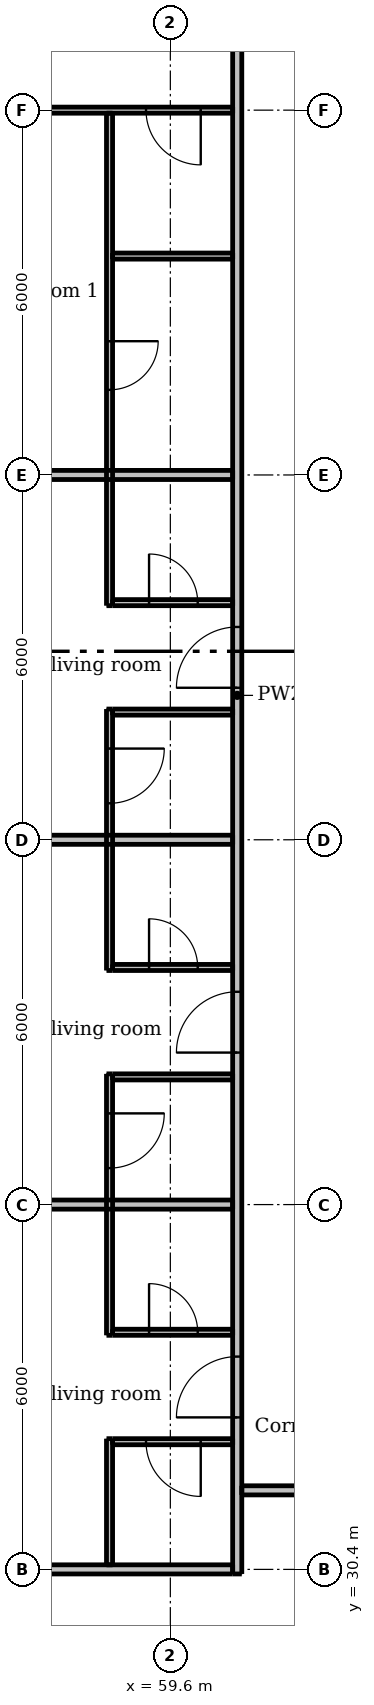
"""IFC4 building model, lengths in metres.
Left out: names, types, materials, properties, quantities, classifications, styles, units other than length and angle.
Written with IfcOpenShell. Run it as: python <this file> out.ifc"""

import sys

from ifc_helpers import new_model, si_unit, direction, frame, frame_2d, origin, place, context, subcontext, project, spatial, rectangle, extrude, element, fill, save


model = new_model("IFC4")
c1 = context("Model", 3, precision=1e-05, world=origin(), true_north=direction((0.0, 1.0)))
c2 = subcontext(c1, "Body", "Model", "MODEL_VIEW")
j1 = project(units=[si_unit("LENGTHUNIT", "METRE"), si_unit("PLANEANGLEUNIT", "RADIAN")], contexts=[c1])
p1 = place(None, origin())
s1 = spatial("IfcSite", under=j1, at=p1, CompositionType="ELEMENT")
p2 = place(p1, origin())
s2 = spatial("IfcBuilding", under=s1, at=p2, CompositionType="ELEMENT")
p3 = place(p2, frame((0.0, 0.0, 23.5)))
s3 = spatial("IfcBuildingStorey", under=s2, at=p3, CompositionType="ELEMENT", Elevation=23.5)
p4 = place(p3, frame((58.6, 30.475, 0.0), z_axis=(0.0, 0.0, 1.0), x_axis=(0.0, 1.0, 0.0)))
e1 = element("IfcWall", 1, at=p4, inside=s3, PredefinedType="PARTITIONING", context=c2, shape_type="SweptSolid", body=[
    extrude(rectangle(XDim=2.075, YDim=0.1, at=frame_2d((1.038, 0.0))), origin(), (0.0, 0.0, 1.0), 3.05),
])
p5 = place(p3, frame((58.6, 38.55, 0.0), z_axis=(0.0, 0.0, 1.0), x_axis=(0.0, -1.0, 0.0)))
e2 = element("IfcWall", 2, at=p5, inside=s3, PredefinedType="PARTITIONING", context=c2, shape_type="SweptSolid", body=[
    extrude(rectangle(XDim=4.3, YDim=0.1, at=frame_2d((2.15, 0.0))), origin(), (0.0, 0.0, 1.0), 3.05),
])
p6 = place(p5, frame((0.65, 0.0, 0.0)))
e3 = element("IfcOpeningElement", 3, at=p6, cuts=e2, PredefinedType="OPENING", context=c2, shape_type="SweptSolid", body=[
    extrude(rectangle(XDim=0.9, YDim=2.1, at=frame_2d((0.45, 1.05))), frame((0.0, 0.06, 0.0), z_axis=(0.0, -1.0, 0.0), x_axis=(1.0, 0.0, 0.0)), (0.0, 0.0, 1.0), 0.12),
])
p7 = place(p3, frame((58.6, 44.55, 0.0), z_axis=(0.0, 0.0, 1.0), x_axis=(0.0, -1.0, 0.0)))
e4 = element("IfcWall", 4, at=p7, inside=s3, PredefinedType="PARTITIONING", context=c2, shape_type="SweptSolid", body=[
    extrude(rectangle(XDim=4.3, YDim=0.1, at=frame_2d((2.15, 0.0))), origin(), (0.0, 0.0, 1.0), 3.05),
])
p8 = place(p7, frame((0.65, 0.0, 0.0)))
e5 = element("IfcOpeningElement", 5, at=p8, cuts=e4, PredefinedType="OPENING", context=c2, shape_type="SweptSolid", body=[
    extrude(rectangle(XDim=0.9, YDim=2.1, at=frame_2d((0.45, 1.05))), frame((0.0, 0.06, 0.0), z_axis=(0.0, -1.0, 0.0), x_axis=(1.0, 0.0, 0.0)), (0.0, 0.0, 1.0), 0.12),
])
p9 = place(p3, frame((58.6, 54.35, 0.0), z_axis=(0.0, 0.0, 1.0), x_axis=(0.0, -1.0, 0.0)))
e6 = element("IfcWall", 6, at=p9, inside=s3, PredefinedType="PARTITIONING", context=c2, shape_type="SweptSolid", body=[
    extrude(rectangle(XDim=8.1, YDim=0.1, at=frame_2d((4.05, 0.0))), origin(), (0.0, 0.0, 1.0), 3.05),
])
p10 = place(p9, frame((3.75, 0.0, 0.0)))
e7 = element("IfcOpeningElement", 7, at=p10, cuts=e6, PredefinedType="OPENING", context=c2, shape_type="SweptSolid", body=[
    extrude(rectangle(XDim=0.8, YDim=2.1, at=frame_2d((0.4, 1.05))), frame((0.0, 0.06, 0.0), z_axis=(0.0, -1.0, 0.0), x_axis=(1.0, 0.0, 0.0)), (0.0, 0.0, 1.0), 0.12),
])
p11 = place(p3, frame((60.625, 54.4, 0.0), z_axis=(0.0, 0.0, 1.0), x_axis=(-1.0, 0.0, 0.0)))
e8 = element("IfcWall", 8, at=p11, inside=s3, PredefinedType="PARTITIONING", context=c2, shape_type="SweptSolid", body=[
    extrude(rectangle(XDim=8.625, YDim=0.1, at=frame_2d((4.312, 0.0))), origin(), (0.0, 0.0, 1.0), 2.516),
])
p12 = place(p11, frame((0.525, 0.0, 0.0)))
e9 = element("IfcOpeningElement", 9, at=p12, cuts=e8, PredefinedType="OPENING", context=c2, shape_type="SweptSolid", body=[
    extrude(rectangle(XDim=0.9, YDim=2.1, at=frame_2d((0.45, 1.05))), frame((0.0, 0.06, 0.0), z_axis=(0.0, -1.0, 0.0), x_axis=(1.0, 0.0, 0.0)), (0.0, 0.0, 1.0), 0.12),
])
p13 = place(p11, frame((4.875, 0.0, 0.0)))
e10 = element("IfcOpeningElement", 10, at=p13, cuts=e8, PredefinedType="OPENING", context=c2, shape_type="SweptSolid", body=[
    extrude(rectangle(XDim=0.9, YDim=2.1, at=frame_2d((0.45, 1.05))), frame((0.0, 0.06, 0.0), z_axis=(0.0, -1.0, 0.0), x_axis=(1.0, 0.0, 0.0)), (0.0, 0.0, 1.0), 0.12),
])
p14 = place(p3, frame((58.65, 52.0, 0.0), z_axis=(0.0, 0.0, 1.0), x_axis=(1.0, 0.0, 0.0)))
e11 = element("IfcWall", 11, at=p14, inside=s3, PredefinedType="PARTITIONING", context=c2, shape_type="SweptSolid", body=[
    extrude(rectangle(XDim=1.975, YDim=0.1, at=frame_2d((0.988, 0.0))), origin(), (0.0, 0.0, 1.0), 3.05),
])
p15 = place(p3, frame((58.65, 46.3, 0.0), z_axis=(0.0, 0.0, 1.0), x_axis=(1.0, 0.0, 0.0)))
e12 = element("IfcWall", 12, at=p15, inside=s3, PredefinedType="PARTITIONING", context=c2, shape_type="SweptSolid", body=[
    extrude(rectangle(XDim=1.975, YDim=0.1, at=frame_2d((0.988, 0.0))), origin(), (0.0, 0.0, 1.0), 3.05),
])
p16 = place(p15, frame((0.6, 0.0, 0.0)))
e13 = element("IfcOpeningElement", 13, at=p16, cuts=e12, PredefinedType="OPENING", context=c2, shape_type="SweptSolid", body=[
    extrude(rectangle(XDim=0.8, YDim=2.1, at=frame_2d((0.4, 1.05))), frame((0.0, 0.06, 0.0), z_axis=(0.0, -1.0, 0.0), x_axis=(1.0, 0.0, 0.0)), (0.0, 0.0, 1.0), 0.12),
])
p17 = place(p3, frame((58.65, 44.5, 0.0), z_axis=(0.0, 0.0, 1.0), x_axis=(1.0, 0.0, 0.0)))
e14 = element("IfcWall", 14, at=p17, inside=s3, PredefinedType="PARTITIONING", context=c2, shape_type="SweptSolid", body=[
    extrude(rectangle(XDim=1.975, YDim=0.1, at=frame_2d((0.988, 0.0))), origin(), (0.0, 0.0, 1.0), 3.05),
])
p18 = place(p3, frame((58.65, 40.3, 0.0), z_axis=(0.0, 0.0, 1.0), x_axis=(1.0, 0.0, 0.0)))
e15 = element("IfcWall", 15, at=p18, inside=s3, PredefinedType="PARTITIONING", context=c2, shape_type="SweptSolid", body=[
    extrude(rectangle(XDim=1.975, YDim=0.1, at=frame_2d((0.988, 0.0))), origin(), (0.0, 0.0, 1.0), 3.05),
])
p19 = place(p18, frame((0.6, 0.0, 0.0)))
e16 = element("IfcOpeningElement", 16, at=p19, cuts=e15, PredefinedType="OPENING", context=c2, shape_type="SweptSolid", body=[
    extrude(rectangle(XDim=0.8, YDim=2.1, at=frame_2d((0.4, 1.05))), frame((0.0, 0.06, 0.0), z_axis=(0.0, -1.0, 0.0), x_axis=(1.0, 0.0, 0.0)), (0.0, 0.0, 1.0), 0.12),
])
p20 = place(p3, frame((58.65, 38.5, 0.0), z_axis=(0.0, 0.0, 1.0), x_axis=(1.0, 0.0, 0.0)))
e17 = element("IfcWall", 17, at=p20, inside=s3, PredefinedType="PARTITIONING", context=c2, shape_type="SweptSolid", body=[
    extrude(rectangle(XDim=1.975, YDim=0.1, at=frame_2d((0.988, 0.0))), origin(), (0.0, 0.0, 1.0), 3.05),
])
p21 = place(p3, frame((58.65, 34.3, 0.0), z_axis=(0.0, 0.0, 1.0), x_axis=(1.0, 0.0, 0.0)))
e18 = element("IfcWall", 18, at=p21, inside=s3, PredefinedType="PARTITIONING", context=c2, shape_type="SweptSolid", body=[
    extrude(rectangle(XDim=1.975, YDim=0.1, at=frame_2d((0.988, 0.0))), origin(), (0.0, 0.0, 1.0), 3.05),
])
p22 = place(p21, frame((0.6, 0.0, 0.0)))
e19 = element("IfcOpeningElement", 19, at=p22, cuts=e18, PredefinedType="OPENING", context=c2, shape_type="SweptSolid", body=[
    extrude(rectangle(XDim=0.8, YDim=2.1, at=frame_2d((0.4, 1.05))), frame((0.0, 0.06, 0.0), z_axis=(0.0, -1.0, 0.0), x_axis=(1.0, 0.0, 0.0)), (0.0, 0.0, 1.0), 0.12),
])
p23 = place(p3, frame((60.625, 32.5, 0.0), z_axis=(0.0, 0.0, 1.0), x_axis=(-1.0, 0.0, 0.0)))
e20 = element("IfcWall", 20, at=p23, inside=s3, PredefinedType="PARTITIONING", context=c2, shape_type="SweptSolid", body=[
    extrude(rectangle(XDim=1.975, YDim=0.1, at=frame_2d((0.988, 0.0))), origin(), (0.0, 0.0, 1.0), 3.05),
])
p24 = place(p23, frame((0.525, 0.0, 0.0)))
e21 = element("IfcOpeningElement", 21, at=p24, cuts=e20, PredefinedType="OPENING", context=c2, shape_type="SweptSolid", body=[
    extrude(rectangle(XDim=0.9, YDim=2.1, at=frame_2d((0.45, 1.05))), frame((0.0, 0.06, 0.0), z_axis=(0.0, -1.0, 0.0), x_axis=(1.0, 0.0, 0.0)), (0.0, 0.0, 1.0), 0.12),
])
p25 = place(p3, frame((60.7, 30.325, 0.0), z_axis=(0.0, 0.0, 1.0), x_axis=(0.0, 1.0, 0.0)))
e22 = element("IfcWall", 22, at=p25, inside=s3, PredefinedType="PARTITIONING", context=c2, shape_type="SweptSolid", body=[
    extrude(rectangle(XDim=28.9, YDim=0.15, at=frame_2d((14.45, 0.0))), origin(), (0.0, 0.0, 1.0), 3.05),
])
p26 = place(p25, frame((2.575, 0.0, 0.0)))
e23 = element("IfcOpeningElement", 23, at=p26, cuts=e22, PredefinedType="OPENING", context=c2, shape_type="SweptSolid", body=[
    extrude(rectangle(XDim=1.0, YDim=2.1, at=frame_2d((0.5, 1.05))), frame((0.0, 0.085, 0.0), z_axis=(0.0, -1.0, 0.0), x_axis=(1.0, 0.0, 0.0)), (0.0, 0.0, 1.0), 0.17),
])
p27 = place(p25, frame((8.575, 0.0, 0.0)))
e24 = element("IfcOpeningElement", 24, at=p27, cuts=e22, PredefinedType="OPENING", context=c2, shape_type="SweptSolid", body=[
    extrude(rectangle(XDim=1.0, YDim=2.1, at=frame_2d((0.5, 1.05))), frame((0.0, 0.085, 0.0), z_axis=(0.0, -1.0, 0.0), x_axis=(1.0, 0.0, 0.0)), (0.0, 0.0, 1.0), 0.17),
])
p28 = place(p25, frame((14.575, 0.0, 0.0)))
e25 = element("IfcOpeningElement", 25, at=p28, cuts=e22, PredefinedType="OPENING", context=c2, shape_type="SweptSolid", body=[
    extrude(rectangle(XDim=1.0, YDim=2.1, at=frame_2d((0.5, 1.05))), frame((0.0, 0.085, 0.0), z_axis=(0.0, -1.0, 0.0), x_axis=(1.0, 0.0, 0.0)), (0.0, 0.0, 1.0), 0.17),
])
p29 = place(p25, frame((26.025, 0.0, 0.0)))
e26 = element("IfcOpeningElement", 26, at=p29, cuts=e22, PredefinedType="OPENING", context=c2, shape_type="SweptSolid", body=[
    extrude(rectangle(XDim=1.0, YDim=2.1, at=frame_2d((0.5, 1.05))), frame((0.0, 0.085, 0.0), z_axis=(0.0, -1.0, 0.0), x_axis=(1.0, 0.0, 0.0)), (0.0, 0.0, 1.0), 0.17),
])
for number, where, z_axis, x_axis in (
    (27, (52.0, 48.4, 0.0), (0.0, 0.0, 1.0), (1.0, 0.0, 0.0)),
    (28, (52.0, 42.4, 0.0), (0.0, 0.0, 1.0), (1.0, 0.0, 0.0)),
    (29, (52.0, 36.4, 0.0), (0.0, 0.0, 1.0), (1.0, 0.0, 0.0)),
):
    element("IfcWall", number, at=place(p3, frame(where, z_axis=z_axis, x_axis=x_axis)), inside=s3, PredefinedType="PARTITIONING", context=c2, shape_type="SweptSolid", body=[
        extrude(rectangle(XDim=8.625, YDim=0.15, at=frame_2d((4.312, 0.0))), origin(), (0.0, 0.0, 1.0), 2.516),
    ])
p30 = place(p3, frame((89.525, 31.7, 0.0), z_axis=(0.0, 0.0, 1.0), x_axis=(-1.0, 0.0, 0.0)))
e30 = element("IfcWall", 30, at=p30, inside=s3, PredefinedType="PARTITIONING", context=c2, shape_type="SweptSolid", body=[
    extrude(rectangle(XDim=28.75, YDim=0.15, at=frame_2d((14.375, 0.0))), origin(), (0.0, 0.0, 1.0), 3.05),
])
p31 = place(p30, frame((24.625, 0.0, 0.0)))
e31 = element("IfcOpeningElement", 31, at=p31, cuts=e30, PredefinedType="OPENING", context=c2, shape_type="SweptSolid", body=[
    extrude(rectangle(XDim=1.0, YDim=2.1, at=frame_2d((0.5, 1.05))), frame((0.0, 0.085, 0.0), z_axis=(0.0, -1.0, 0.0), x_axis=(1.0, 0.0, 0.0)), (0.0, 0.0, 1.0), 0.17),
])
p32 = place(p30, frame((10.225, 0.0, 0.0)))
e32 = element("IfcOpeningElement", 32, at=p32, cuts=e30, PredefinedType="OPENING", context=c2, shape_type="SweptSolid", body=[
    extrude(rectangle(XDim=1.0, YDim=2.1, at=frame_2d((0.5, 1.05))), frame((0.0, 0.085, 0.0), z_axis=(0.0, -1.0, 0.0), x_axis=(1.0, 0.0, 0.0)), (0.0, 0.0, 1.0), 0.17),
])
p33 = place(p30, frame((2.425, 0.0, 0.0)))
e33 = element("IfcOpeningElement", 33, at=p33, cuts=e30, PredefinedType="OPENING", context=c2, shape_type="SweptSolid", body=[
    extrude(rectangle(XDim=1.0, YDim=2.1, at=frame_2d((0.5, 1.05))), frame((0.0, 0.085, 0.0), z_axis=(0.0, -1.0, 0.0), x_axis=(1.0, 0.0, 0.0)), (0.0, 0.0, 1.0), 0.17),
])
p34 = place(p3, frame((52.0, 30.4, 0.0), z_axis=(0.0, 0.0, 1.0), x_axis=(1.0, 0.0, 0.0)))
e34 = element("IfcWall", 34, at=p34, inside=s3, PredefinedType="PARTITIONING", context=c2, shape_type="SweptSolid", body=[
    extrude(rectangle(XDim=8.625, YDim=0.15, at=frame_2d((4.312, 0.0))), origin(), (0.0, 0.0, 1.0), 2.647),
])
p35 = place(p26, origin())
e35 = element("IfcDoor", 35, at=p35, inside=s3, OperationType="SINGLE_SWING_LEFT", PredefinedType="DOOR", context=c2, shape_type="SweptSolid", body=[
    extrude(rectangle(XDim=1.0, YDim=2.1, at=frame_2d((0.5, 1.05))), frame((0.0, 0.025, 0.0), z_axis=(0.0, -1.0, 0.0), x_axis=(1.0, 0.0, 0.0)), (0.0, 0.0, 1.0), 0.05),
])
fill(e23, e35)
p36 = place(p24, origin())
e36 = element("IfcDoor", 36, at=p36, inside=s3, OperationType="SINGLE_SWING_LEFT", PredefinedType="DOOR", context=c2, shape_type="SweptSolid", body=[
    extrude(rectangle(XDim=0.9, YDim=2.1, at=frame_2d((0.45, 1.05))), frame((0.0, 0.025, 0.0), z_axis=(0.0, -1.0, 0.0), x_axis=(1.0, 0.0, 0.0)), (0.0, 0.0, 1.0), 0.05),
])
fill(e21, e36)
p37 = place(p22, origin())
e37 = element("IfcDoor", 37, at=p37, inside=s3, OperationType="SINGLE_SWING_LEFT", PredefinedType="DOOR", context=c2, shape_type="SweptSolid", body=[
    extrude(rectangle(XDim=0.8, YDim=2.1, at=frame_2d((0.4, 1.05))), frame((0.0, 0.025, 0.0), z_axis=(0.0, -1.0, 0.0), x_axis=(1.0, 0.0, 0.0)), (0.0, 0.0, 1.0), 0.05),
])
fill(e19, e37)
p38 = place(p27, origin())
e38 = element("IfcDoor", 38, at=p38, inside=s3, OperationType="SINGLE_SWING_LEFT", PredefinedType="DOOR", context=c2, shape_type="SweptSolid", body=[
    extrude(rectangle(XDim=1.0, YDim=2.1, at=frame_2d((0.5, 1.05))), frame((0.0, 0.025, 0.0), z_axis=(0.0, -1.0, 0.0), x_axis=(1.0, 0.0, 0.0)), (0.0, 0.0, 1.0), 0.05),
])
fill(e24, e38)
p39 = place(p6, origin())
e39 = element("IfcDoor", 39, at=p39, inside=s3, OperationType="SINGLE_SWING_LEFT", PredefinedType="DOOR", context=c2, shape_type="SweptSolid", body=[
    extrude(rectangle(XDim=0.9, YDim=2.1, at=frame_2d((0.45, 1.05))), frame((0.0, 0.025, 0.0), z_axis=(0.0, -1.0, 0.0), x_axis=(1.0, 0.0, 0.0)), (0.0, 0.0, 1.0), 0.05),
])
fill(e3, e39)
p40 = place(p19, origin())
e40 = element("IfcDoor", 40, at=p40, inside=s3, OperationType="SINGLE_SWING_LEFT", PredefinedType="DOOR", context=c2, shape_type="SweptSolid", body=[
    extrude(rectangle(XDim=0.8, YDim=2.1, at=frame_2d((0.4, 1.05))), frame((0.0, 0.025, 0.0), z_axis=(0.0, -1.0, 0.0), x_axis=(1.0, 0.0, 0.0)), (0.0, 0.0, 1.0), 0.05),
])
fill(e16, e40)
p41 = place(p28, origin())
e41 = element("IfcDoor", 41, at=p41, inside=s3, OperationType="SINGLE_SWING_LEFT", PredefinedType="DOOR", context=c2, shape_type="SweptSolid", body=[
    extrude(rectangle(XDim=1.0, YDim=2.1, at=frame_2d((0.5, 1.05))), frame((0.0, 0.025, 0.0), z_axis=(0.0, -1.0, 0.0), x_axis=(1.0, 0.0, 0.0)), (0.0, 0.0, 1.0), 0.05),
])
fill(e25, e41)
p42 = place(p8, origin())
e42 = element("IfcDoor", 42, at=p42, inside=s3, OperationType="SINGLE_SWING_LEFT", PredefinedType="DOOR", context=c2, shape_type="SweptSolid", body=[
    extrude(rectangle(XDim=0.9, YDim=2.1, at=frame_2d((0.45, 1.05))), frame((0.0, 0.025, 0.0), z_axis=(0.0, -1.0, 0.0), x_axis=(1.0, 0.0, 0.0)), (0.0, 0.0, 1.0), 0.05),
])
fill(e5, e42)
p43 = place(p16, origin())
e43 = element("IfcDoor", 43, at=p43, inside=s3, OperationType="SINGLE_SWING_LEFT", PredefinedType="DOOR", context=c2, shape_type="SweptSolid", body=[
    extrude(rectangle(XDim=0.8, YDim=2.1, at=frame_2d((0.4, 1.05))), frame((0.0, 0.025, 0.0), z_axis=(0.0, -1.0, 0.0), x_axis=(1.0, 0.0, 0.0)), (0.0, 0.0, 1.0), 0.05),
])
fill(e13, e43)
p44 = place(p12, origin())
e44 = element("IfcDoor", 44, at=p44, inside=s3, OperationType="SINGLE_SWING_LEFT", PredefinedType="DOOR", context=c2, shape_type="SweptSolid", body=[
    extrude(rectangle(XDim=0.9, YDim=2.1, at=frame_2d((0.45, 1.05))), frame((0.0, 0.025, 0.0), z_axis=(0.0, -1.0, 0.0), x_axis=(1.0, 0.0, 0.0)), (0.0, 0.0, 1.0), 0.05),
])
fill(e9, e44)
p45 = place(p10, origin())
e45 = element("IfcDoor", 45, at=p45, inside=s3, OperationType="SINGLE_SWING_LEFT", PredefinedType="DOOR", context=c2, shape_type="SweptSolid", body=[
    extrude(rectangle(XDim=0.8, YDim=2.1, at=frame_2d((0.4, 1.05))), frame((0.0, 0.025, 0.0), z_axis=(0.0, -1.0, 0.0), x_axis=(1.0, 0.0, 0.0)), (0.0, 0.0, 1.0), 0.05),
])
fill(e7, e45)
save(model, sys.argv[1])
